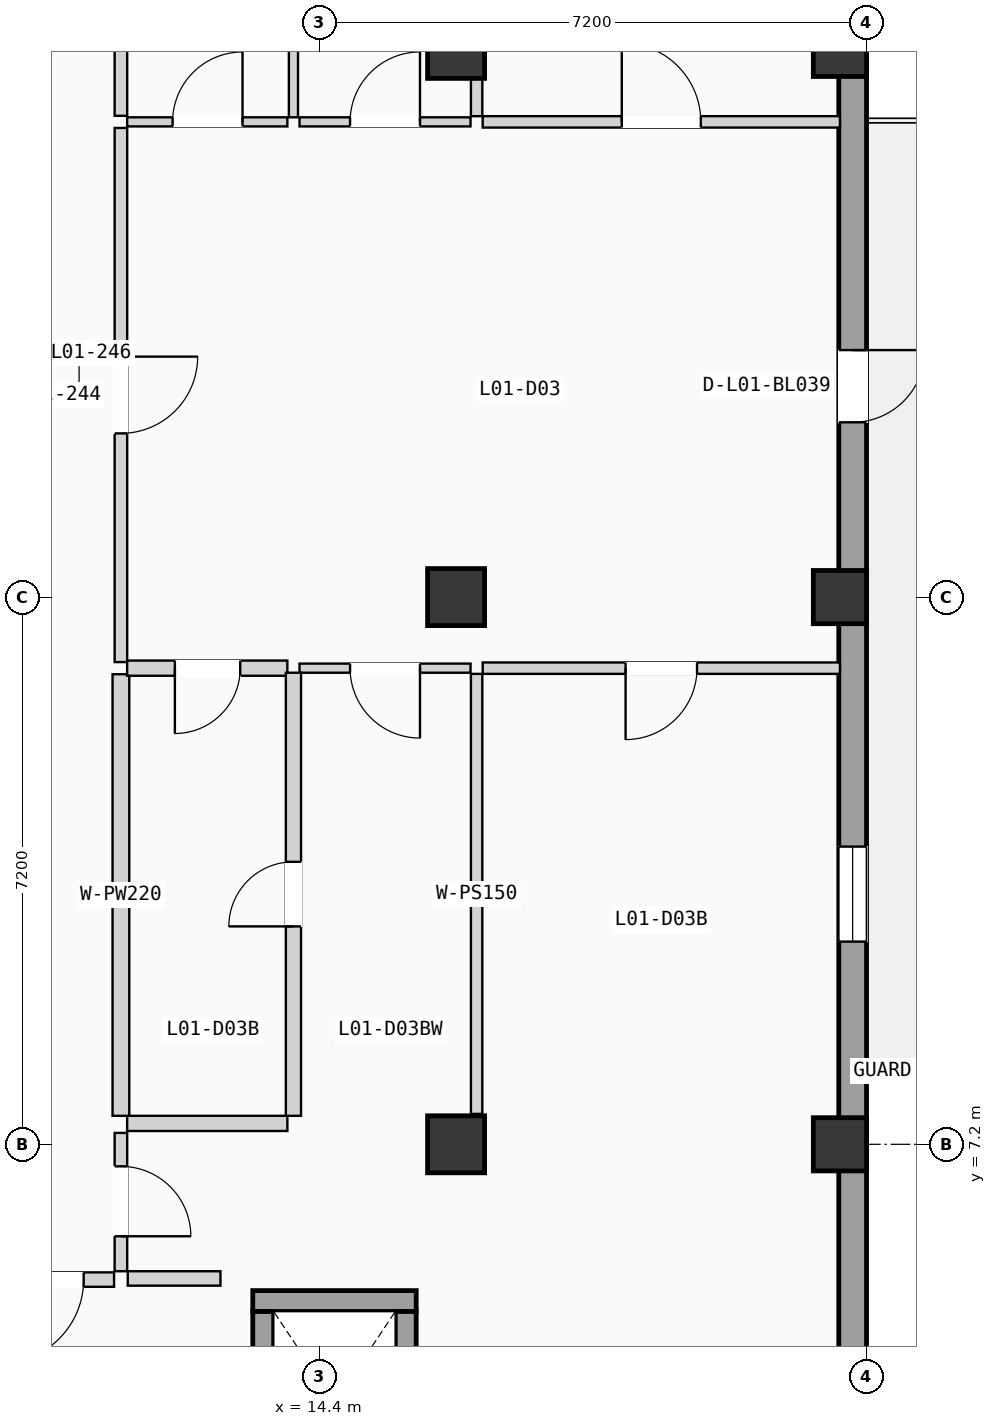
"""IFC4 building model, lengths in metres.
Left out: names, types, materials, properties, quantities, classifications, styles, units other than length and angle.
Written with IfcOpenShell. Run it as: python <this file> out.ifc"""

import sys

from ifc_helpers import new_model, si_unit, direction, frame, frame_2d, origin, origin_2d, place, context, subcontext, project, spatial, rectangle, extrude, element, fill, save


model = new_model("IFC4")
c1 = context("Model", 3, precision=1e-05, world=origin(), true_north=direction((0.0, 1.0)))
c2 = subcontext(c1, "Body", "Model", "MODEL_VIEW")
j1 = project(units=[si_unit("LENGTHUNIT", "METRE"), si_unit("PLANEANGLEUNIT", "RADIAN")], contexts=[c1])
p1 = place(None, origin())
s1 = spatial("IfcSite", under=j1, at=p1, CompositionType="ELEMENT")
p2 = place(p1, origin())
s2 = spatial("IfcBuilding", under=s1, at=p2, CompositionType="ELEMENT")
p3 = place(p2, frame((0.0, 0.0, 4.9)))
s3 = spatial("IfcBuildingStorey", under=s2, at=p3, CompositionType="ELEMENT", Elevation=4.9)
for number, where, z_axis, x_axis in (
    (1, (16.2, 7.2, 0.0), (0.0, 0.0, 1.0), (1.0, 0.0, 0.0)),
    (2, (16.2, 14.4, 0.0), (0.0, 0.0, 1.0), (1.0, 0.0, 0.0)),
    (3, (16.2, 21.6, 0.0), (0.0, 0.0, 1.0), (1.0, 0.0, 0.0)),
):
    element("IfcColumn", number, at=place(p3, frame(where, z_axis=z_axis, x_axis=x_axis)), inside=s3, PredefinedType="COLUMN", context=c2, shape_type="SweptSolid", body=[
        extrude(rectangle(XDim=0.75, YDim=0.75, at=origin_2d()), origin(), (0.0, 0.0, 1.0), 3.675),
    ])
for number, where, z_axis, x_axis in (
    (4, (21.25, 7.2, 0.0), (0.0, 0.0, 1.0), (1.0, 0.0, 0.0)),
    (5, (21.25, 14.4, 0.0), (0.0, 0.0, 1.0), (1.0, 0.0, 0.0)),
    (6, (21.25, 21.6, 0.0), (0.0, 0.0, 1.0), (1.0, 0.0, 0.0)),
):
    element("IfcColumn", number, at=place(p3, frame(where, z_axis=z_axis, x_axis=x_axis)), inside=s3, PredefinedType="COLUMN", context=c2, shape_type="SweptSolid", body=[
        extrude(rectangle(XDim=0.7, YDim=0.7, at=origin_2d()), origin(), (0.0, 0.0, 1.0), 3.675),
    ])
p4 = place(p3, frame((21.417, 0.365, 0.0), z_axis=(0.0, 0.0, 1.0), x_axis=(0.0, 1.0, 0.0)))
e7 = element("IfcWall", 7, at=p4, inside=s3, PredefinedType="SOLIDWALL", context=c2, shape_type="SweptSolid", body=[
    extrude(rectangle(XDim=49.67, YDim=0.365, at=frame_2d((24.835, 0.0))), origin(), (0.0, 0.0, 1.0), 3.415),
])
p5 = place(p4, frame((16.335, 0.0, 0.0)))
e8 = element("IfcOpeningElement", 8, at=p5, cuts=e7, PredefinedType="OPENING", context=c2, shape_type="SweptSolid", body=[
    extrude(rectangle(XDim=0.95, YDim=2.15, at=frame_2d((0.475, 1.075))), frame((0.0, 0.192, 0.0), z_axis=(0.0, -1.0, 0.0), x_axis=(1.0, 0.0, 0.0)), (0.0, 0.0, 1.0), 0.385),
])
p6 = place(p4, frame((9.502, 0.0, 0.9)))
e9 = element("IfcOpeningElement", 9, at=p6, cuts=e7, PredefinedType="OPENING", context=c2, shape_type="SweptSolid", body=[
    extrude(rectangle(XDim=1.25, YDim=1.2, at=frame_2d((0.625, 0.6))), frame((0.0, 0.192, 0.0), z_axis=(0.0, -1.0, 0.0), x_axis=(1.0, 0.0, 0.0)), (0.0, 0.0, 1.0), 0.385),
])
p7 = place(p4, frame((23.204, 0.0, 0.9)))
e10 = element("IfcOpeningElement", 10, at=p7, cuts=e7, PredefinedType="OPENING", context=c2, shape_type="SweptSolid", body=[
    extrude(rectangle(XDim=1.25, YDim=1.35, at=frame_2d((0.625, 0.675))), frame((0.0, 0.192, 0.0), z_axis=(0.0, -1.0, 0.0), x_axis=(1.0, 0.0, 0.0)), (0.0, 0.0, 1.0), 0.385),
])
p8 = place(p4, frame((32.43, 0.0, 0.0)))
e11 = element("IfcOpeningElement", 11, at=p8, cuts=e7, PredefinedType="OPENING", context=c2, shape_type="SweptSolid", body=[
    extrude(rectangle(XDim=1.08, YDim=2.18, at=frame_2d((0.54, 1.09))), frame((0.0, 0.192, 0.0), z_axis=(0.0, -1.0, 0.0), x_axis=(1.0, 0.0, 0.0)), (0.0, 0.0, 1.0), 0.385),
])
p9 = place(p4, frame((29.35, 0.0, 0.9)))
e12 = element("IfcOpeningElement", 12, at=p9, cuts=e7, PredefinedType="OPENING", context=c2, shape_type="SweptSolid", body=[
    extrude(rectangle(XDim=1.25, YDim=1.5, at=frame_2d((0.625, 0.75))), frame((0.0, 0.192, 0.0), z_axis=(0.0, -1.0, 0.0), x_axis=(1.0, 0.0, 0.0)), (0.0, 0.0, 1.0), 0.385),
])
p10 = place(p4, frame((39.354, 0.0, 0.9)))
e13 = element("IfcOpeningElement", 13, at=p10, cuts=e7, PredefinedType="OPENING", context=c2, shape_type="SweptSolid", body=[
    extrude(rectangle(XDim=1.25, YDim=1.65, at=frame_2d((0.625, 0.825))), frame((0.0, 0.192, 0.0), z_axis=(0.0, -1.0, 0.0), x_axis=(1.0, 0.0, 0.0)), (0.0, 0.0, 1.0), 0.385),
])
p11 = place(p3, frame((13.525, 5.137, 0.0), z_axis=(0.0, 0.0, 1.0), x_axis=(1.0, 0.0, 0.0)))
e14 = element("IfcWall", 14, at=p11, inside=s3, PredefinedType="SHEAR", context=c2, shape_type="SweptSolid", body=[
    extrude(rectangle(XDim=2.15, YDim=0.275, at=frame_2d((1.075, 0.0))), origin(), (0.0, 0.0, 1.0), 3.415),
])
p12 = place(p3, frame((13.663, 2.6, 0.0), z_axis=(0.0, 0.0, 1.0), x_axis=(0.0, 1.0, 0.0)))
e15 = element("IfcWall", 15, at=p12, inside=s3, PredefinedType="SHEAR", context=c2, shape_type="SweptSolid", body=[
    extrude(rectangle(XDim=2.4, YDim=0.275, at=frame_2d((1.2, 0.0))), origin(), (0.0, 0.0, 1.0), 3.415),
])
p13 = place(p12, frame((0.65, 0.0, 0.0)))
e16 = element("IfcOpeningElement", 16, at=p13, cuts=e15, PredefinedType="OPENING", context=c2, shape_type="SweptSolid", body=[
    extrude(rectangle(XDim=1.1, YDim=2.15, at=frame_2d((0.55, 1.075))), frame((0.0, 0.147, 0.0), z_axis=(0.0, -1.0, 0.0), x_axis=(1.0, 0.0, 0.0)), (0.0, 0.0, 1.0), 0.295),
])
p14 = place(p3, frame((15.538, 2.6, 0.0), z_axis=(0.0, 0.0, 1.0), x_axis=(0.0, 1.0, 0.0)))
e17 = element("IfcWall", 17, at=p14, inside=s3, PredefinedType="SHEAR", context=c2, shape_type="SweptSolid", body=[
    extrude(rectangle(XDim=2.4, YDim=0.275, at=frame_2d((1.2, 0.0))), origin(), (0.0, 0.0, 1.0), 3.415),
])
p15 = place(p3, frame((11.88, 5.435, 0.0), z_axis=(0.0, 0.0, 1.0), x_axis=(1.0, 0.0, 0.0)))
e18 = element("IfcWall", 18, at=p15, inside=s3, PredefinedType="PARTITIONING", context=c2, shape_type="SweptSolid", body=[
    extrude(rectangle(XDim=1.22, YDim=0.19, at=frame_2d((0.61, 0.0))), origin(), (0.0, 0.0, 1.0), 3.395),
])
p16 = place(p3, frame((9.7, 5.42, 0.0), z_axis=(0.0, 0.0, 1.0), x_axis=(1.0, 0.0, 0.0)))
e19 = element("IfcWall", 19, at=p16, inside=s3, PredefinedType="PARTITIONING", context=c2, shape_type="SweptSolid", body=[
    extrude(rectangle(XDim=2.0, YDim=0.19, at=frame_2d((1.0, 0.0))), origin(), (0.0, 0.0, 1.0), 3.395),
])
p17 = place(p16, frame((0.5, 0.0, 0.0)))
e20 = element("IfcOpeningElement", 20, at=p17, cuts=e19, PredefinedType="OPENING", context=c2, shape_type="SweptSolid", body=[
    extrude(rectangle(XDim=1.1, YDim=2.12, at=frame_2d((0.55, 1.06))), frame((0.0, 0.105, 0.0), z_axis=(0.0, -1.0, 0.0), x_axis=(1.0, 0.0, 0.0)), (0.0, 0.0, 1.0), 0.21),
])
p18 = place(p3, frame((11.79, 5.53, 0.0), z_axis=(0.0, 0.0, 1.0), x_axis=(0.0, 1.0, 0.0)))
e21 = element("IfcWall", 21, at=p18, inside=s3, PredefinedType="PARTITIONING", context=c2, shape_type="SweptSolid", body=[
    extrude(rectangle(XDim=1.82, YDim=0.165, at=frame_2d((0.91, 0.0))), origin(), (0.0, 0.0, 1.0), 3.395),
])
p19 = place(p18, frame((0.46, 0.0, 0.0)))
e22 = element("IfcOpeningElement", 22, at=p19, cuts=e21, PredefinedType="OPENING", context=c2, shape_type="SweptSolid", body=[
    extrude(rectangle(XDim=0.92, YDim=2.04, at=frame_2d((0.46, 1.02))), frame((0.0, 0.093, 0.0), z_axis=(0.0, -1.0, 0.0), x_axis=(1.0, 0.0, 0.0)), (0.0, 0.0, 1.0), 0.185),
])
p20 = place(p3, frame((11.872, 7.475, 0.0), z_axis=(0.0, 0.0, 1.0), x_axis=(1.0, 0.0, 0.0)))
e23 = element("IfcWall", 23, at=p20, inside=s3, PredefinedType="PLUMBINGWALL", context=c2, shape_type="SweptSolid", body=[
    extrude(rectangle(XDim=2.108, YDim=0.2, at=frame_2d((1.054, 0.0))), origin(), (0.0, 0.0, 1.0), 3.395),
])
p21 = place(p3, frame((11.79, 13.545, 0.0), z_axis=(0.0, 0.0, 1.0), x_axis=(0.0, 1.0, 0.0)))
e24 = element("IfcWall", 24, at=p21, inside=s3, PredefinedType="PARTITIONING", context=c2, shape_type="SweptSolid", body=[
    extrude(rectangle(XDim=7.028, YDim=0.165, at=frame_2d((3.514, 0.0))), origin(), (0.0, 0.0, 1.0), 3.395),
])
p22 = place(p21, frame((3.009, 0.0, 0.0)))
e25 = element("IfcOpeningElement", 25, at=p22, cuts=e24, PredefinedType="OPENING", context=c2, shape_type="SweptSolid", body=[
    extrude(rectangle(XDim=1.01, YDim=2.11, at=frame_2d((0.505, 1.055))), frame((0.0, 0.093, 0.0), z_axis=(0.0, -1.0, 0.0), x_axis=(1.0, 0.0, 0.0)), (0.0, 0.0, 1.0), 0.185),
])
p23 = place(p3, frame((11.79, 7.575, 0.0), z_axis=(0.0, 0.0, 1.0), x_axis=(0.0, 1.0, 0.0)))
e26 = element("IfcWall", 26, at=p23, inside=s3, PredefinedType="PLUMBINGWALL", context=c2, shape_type="SweptSolid", body=[
    extrude(rectangle(XDim=5.81, YDim=0.22, at=frame_2d((2.905, 0.0))), origin(), (0.0, 0.0, 1.0), 3.395),
])
p24 = place(p3, frame((11.79, 20.733, 0.0), z_axis=(0.0, 0.0, 1.0), x_axis=(0.0, 1.0, 0.0)))
e27 = element("IfcWall", 27, at=p24, inside=s3, PredefinedType="PARTITIONING", context=c2, shape_type="SweptSolid", body=[
    extrude(rectangle(XDim=5.785, YDim=0.165, at=frame_2d((2.893, 0.0))), origin(), (0.0, 0.0, 1.0), 3.395),
])
p25 = place(p3, frame((11.872, 13.465, 0.0), z_axis=(0.0, 0.0, 1.0), x_axis=(1.0, 0.0, 0.0)))
e28 = element("IfcWall", 28, at=p25, inside=s3, PredefinedType="PLUMBINGWALL", context=c2, shape_type="SweptSolid", body=[
    extrude(rectangle(XDim=2.108, YDim=0.2, at=frame_2d((1.054, 0.0))), origin(), (0.0, 0.0, 1.0), 3.395),
])
p26 = place(p25, frame((0.628, 0.0, 0.0)))
e29 = element("IfcOpeningElement", 29, at=p26, cuts=e28, PredefinedType="OPENING", context=c2, shape_type="SweptSolid", body=[
    extrude(rectangle(XDim=0.86, YDim=2.0, at=frame_2d((0.43, 1.0))), frame((0.0, 0.11, 0.0), z_axis=(0.0, -1.0, 0.0), x_axis=(1.0, 0.0, 0.0)), (0.0, 0.0, 1.0), 0.22),
])
p27 = place(p3, frame((11.872, 20.653, 0.0), z_axis=(0.0, 0.0, 1.0), x_axis=(1.0, 0.0, 0.0)))
e30 = element("IfcWall", 30, at=p27, inside=s3, PredefinedType="PARTITIONING", context=c2, shape_type="SweptSolid", body=[
    extrude(rectangle(XDim=2.108, YDim=0.12, at=frame_2d((1.054, 0.0))), origin(), (0.0, 0.0, 1.0), 3.395),
])
p28 = place(p27, frame((0.598, 0.0, 0.0)))
e31 = element("IfcOpeningElement", 31, at=p28, cuts=e30, PredefinedType="OPENING", context=c2, shape_type="SweptSolid", body=[
    extrude(rectangle(XDim=0.92, YDim=2.02, at=frame_2d((0.46, 1.01))), frame((0.0, 0.07, 0.0), z_axis=(0.0, -1.0, 0.0), x_axis=(1.0, 0.0, 0.0)), (0.0, 0.0, 1.0), 0.14),
])
p29 = place(p3, frame((16.55, 13.465, 0.0), z_axis=(0.0, 0.0, 1.0), x_axis=(1.0, 0.0, 0.0)))
e32 = element("IfcWall", 32, at=p29, inside=s3, PredefinedType="PARTITIONING", context=c2, shape_type="SweptSolid", body=[
    extrude(rectangle(XDim=4.7, YDim=0.15, at=frame_2d((2.35, 0.0))), origin(), (0.0, 0.0, 1.0), 3.395),
])
p30 = place(p29, frame((1.88, 0.0, 0.0)))
e33 = element("IfcOpeningElement", 33, at=p30, cuts=e32, PredefinedType="OPENING", context=c2, shape_type="SweptSolid", body=[
    extrude(rectangle(XDim=0.94, YDim=2.06, at=frame_2d((0.47, 1.03))), frame((0.0, 0.085, 0.0), z_axis=(0.0, -1.0, 0.0), x_axis=(1.0, 0.0, 0.0)), (0.0, 0.0, 1.0), 0.17),
])
p31 = place(p3, frame((14.14, 13.465, 0.0), z_axis=(0.0, 0.0, 1.0), x_axis=(1.0, 0.0, 0.0)))
e34 = element("IfcWall", 34, at=p31, inside=s3, PredefinedType="PARTITIONING", context=c2, shape_type="SweptSolid", body=[
    extrude(rectangle(XDim=2.25, YDim=0.12, at=frame_2d((1.125, 0.0))), origin(), (0.0, 0.0, 1.0), 3.395),
])
p32 = place(p31, frame((0.665, 0.0, 0.0)))
e35 = element("IfcOpeningElement", 35, at=p32, cuts=e34, PredefinedType="OPENING", context=c2, shape_type="SweptSolid", body=[
    extrude(rectangle(XDim=0.92, YDim=2.02, at=frame_2d((0.46, 1.01))), frame((0.0, 0.07, 0.0), z_axis=(0.0, -1.0, 0.0), x_axis=(1.0, 0.0, 0.0)), (0.0, 0.0, 1.0), 0.14),
])
p33 = place(p3, frame((16.55, 20.653, 0.0), z_axis=(0.0, 0.0, 1.0), x_axis=(1.0, 0.0, 0.0)))
e36 = element("IfcWall", 36, at=p33, inside=s3, PredefinedType="PARTITIONING", context=c2, shape_type="SweptSolid", body=[
    extrude(rectangle(XDim=4.7, YDim=0.15, at=frame_2d((2.35, 0.0))), origin(), (0.0, 0.0, 1.0), 3.395),
])
p34 = place(p33, frame((1.83, 0.0, 0.0)))
e37 = element("IfcOpeningElement", 37, at=p34, cuts=e36, PredefinedType="OPENING", context=c2, shape_type="SweptSolid", body=[
    extrude(rectangle(XDim=1.04, YDim=2.08, at=frame_2d((0.52, 1.04))), frame((0.0, 0.085, 0.0), z_axis=(0.0, -1.0, 0.0), x_axis=(1.0, 0.0, 0.0)), (0.0, 0.0, 1.0), 0.17),
])
p35 = place(p3, frame((14.14, 20.653, 0.0), z_axis=(0.0, 0.0, 1.0), x_axis=(1.0, 0.0, 0.0)))
e38 = element("IfcWall", 38, at=p35, inside=s3, PredefinedType="PARTITIONING", context=c2, shape_type="SweptSolid", body=[
    extrude(rectangle(XDim=2.25, YDim=0.12, at=frame_2d((1.125, 0.0))), origin(), (0.0, 0.0, 1.0), 3.395),
])
p36 = place(p35, frame((0.665, 0.0, 0.0)))
e39 = element("IfcOpeningElement", 39, at=p36, cuts=e38, PredefinedType="OPENING", context=c2, shape_type="SweptSolid", body=[
    extrude(rectangle(XDim=0.92, YDim=2.02, at=frame_2d((0.46, 1.01))), frame((0.0, 0.07, 0.0), z_axis=(0.0, -1.0, 0.0), x_axis=(1.0, 0.0, 0.0)), (0.0, 0.0, 1.0), 0.14),
])
p37 = place(p3, frame((14.06, 7.575, 0.0), z_axis=(0.0, 0.0, 1.0), x_axis=(0.0, 1.0, 0.0)))
e40 = element("IfcWall", 40, at=p37, inside=s3, PredefinedType="PLUMBINGWALL", context=c2, shape_type="SweptSolid", body=[
    extrude(rectangle(XDim=5.83, YDim=0.2, at=frame_2d((2.915, 0.0))), origin(), (0.0, 0.0, 1.0), 3.395),
])
p38 = place(p37, frame((2.492, 0.0, 0.0)))
e41 = element("IfcOpeningElement", 41, at=p38, cuts=e40, PredefinedType="OPENING", context=c2, shape_type="SweptSolid", body=[
    extrude(rectangle(XDim=0.85, YDim=2.01, at=frame_2d((0.425, 1.005))), frame((0.0, 0.11, 0.0), z_axis=(0.0, -1.0, 0.0), x_axis=(1.0, 0.0, 0.0)), (0.0, 0.0, 1.0), 0.22),
])
p39 = place(p3, frame((14.06, 20.713, 0.0), z_axis=(0.0, 0.0, 1.0), x_axis=(0.0, 1.0, 0.0)))
e42 = element("IfcWall", 42, at=p39, inside=s3, PredefinedType="PARTITIONING", context=c2, shape_type="SweptSolid", body=[
    extrude(rectangle(XDim=5.805, YDim=0.12, at=frame_2d((2.903, 0.0))), origin(), (0.0, 0.0, 1.0), 3.395),
])
p40 = place(p3, frame((16.47, 7.6, 0.0), z_axis=(0.0, 0.0, 1.0), x_axis=(0.0, 1.0, 0.0)))
e43 = element("IfcWall", 43, at=p40, inside=s3, PredefinedType="PARTITIONING", context=c2, shape_type="SweptSolid", body=[
    extrude(rectangle(XDim=5.79, YDim=0.15, at=frame_2d((2.895, 0.0))), origin(), (0.0, 0.0, 1.0), 3.395),
])
p41 = place(p3, frame((16.47, 20.728, 0.0), z_axis=(0.0, 0.0, 1.0), x_axis=(0.0, 1.0, 0.0)))
e44 = element("IfcWall", 44, at=p41, inside=s3, PredefinedType="PARTITIONING", context=c2, shape_type="SweptSolid", body=[
    extrude(rectangle(XDim=5.79, YDim=0.15, at=frame_2d((2.895, 0.0))), origin(), (0.0, 0.0, 1.0), 3.395),
])
p42 = place(p5, frame((0.95, 0.0, 0.0), z_axis=(0.0, 0.0, 1.0), x_axis=(-1.0, 0.0, 0.0)))
e45 = element("IfcDoor", 45, at=p42, inside=s3, OperationType="SINGLE_SWING_RIGHT", PredefinedType="DOOR", context=c2, shape_type="SweptSolid", body=[
    extrude(rectangle(XDim=0.95, YDim=2.15, at=frame_2d((0.475, 1.075))), frame((0.0, 0.025, 0.0), z_axis=(0.0, -1.0, 0.0), x_axis=(1.0, 0.0, 0.0)), (0.0, 0.0, 1.0), 0.05),
])
fill(e8, e45)
p43 = place(p6, origin())
e46 = element("IfcWindow", 46, at=p43, inside=s3, PartitioningType="SINGLE_PANEL", PredefinedType="WINDOW", context=c2, shape_type="SweptSolid", body=[
    extrude(rectangle(XDim=1.25, YDim=1.2, at=frame_2d((0.625, 0.6))), frame((0.0, 0.03, 0.0), z_axis=(0.0, -1.0, 0.0), x_axis=(1.0, 0.0, 0.0)), (0.0, 0.0, 1.0), 0.06),
])
fill(e9, e46)
p44 = place(p17, frame((1.1, 0.0, 0.0), z_axis=(0.0, 0.0, 1.0), x_axis=(-1.0, 0.0, 0.0)))
e47 = element("IfcDoor", 47, at=p44, inside=s3, OperationType="SINGLE_SWING_LEFT", PredefinedType="DOOR", context=c2, shape_type="SweptSolid", body=[
    extrude(rectangle(XDim=1.1, YDim=2.12, at=frame_2d((0.55, 1.06))), frame((0.0, 0.025, 0.0), z_axis=(0.0, -1.0, 0.0), x_axis=(1.0, 0.0, 0.0)), (0.0, 0.0, 1.0), 0.05),
])
fill(e20, e47)
p45 = place(p19, frame((0.92, 0.0, 0.0), z_axis=(0.0, 0.0, 1.0), x_axis=(-1.0, 0.0, 0.0)))
e48 = element("IfcDoor", 48, at=p45, inside=s3, OperationType="SINGLE_SWING_LEFT", PredefinedType="DOOR", context=c2, shape_type="SweptSolid", body=[
    extrude(rectangle(XDim=0.92, YDim=2.04, at=frame_2d((0.46, 1.02))), frame((0.0, 0.025, 0.0), z_axis=(0.0, -1.0, 0.0), x_axis=(1.0, 0.0, 0.0)), (0.0, 0.0, 1.0), 0.05),
])
fill(e22, e48)
p46 = place(p22, frame((1.01, 0.0, 0.0), z_axis=(0.0, 0.0, 1.0), x_axis=(-1.0, 0.0, 0.0)))
e49 = element("IfcDoor", 49, at=p46, inside=s3, OperationType="SINGLE_SWING_RIGHT", PredefinedType="DOOR", context=c2, shape_type="SweptSolid", body=[
    extrude(rectangle(XDim=1.01, YDim=2.11, at=frame_2d((0.505, 1.055))), frame((0.0, 0.025, 0.0), z_axis=(0.0, -1.0, 0.0), x_axis=(1.0, 0.0, 0.0)), (0.0, 0.0, 1.0), 0.05),
])
fill(e25, e49)
p47 = place(p26, frame((0.86, 0.0, 0.0), z_axis=(0.0, 0.0, 1.0), x_axis=(-1.0, 0.0, 0.0)))
e50 = element("IfcDoor", 50, at=p47, inside=s3, OperationType="SINGLE_SWING_LEFT", PredefinedType="DOOR", context=c2, shape_type="SweptSolid", body=[
    extrude(rectangle(XDim=0.86, YDim=2.0, at=frame_2d((0.43, 1.0))), frame((0.0, 0.025, 0.0), z_axis=(0.0, -1.0, 0.0), x_axis=(1.0, 0.0, 0.0)), (0.0, 0.0, 1.0), 0.05),
])
fill(e29, e50)
p48 = place(p28, origin())
e51 = element("IfcDoor", 51, at=p48, inside=s3, OperationType="SINGLE_SWING_RIGHT", PredefinedType="DOOR", context=c2, shape_type="SweptSolid", body=[
    extrude(rectangle(XDim=0.92, YDim=2.02, at=frame_2d((0.46, 1.01))), frame((0.0, 0.025, 0.0), z_axis=(0.0, -1.0, 0.0), x_axis=(1.0, 0.0, 0.0)), (0.0, 0.0, 1.0), 0.05),
])
fill(e31, e51)
p49 = place(p30, frame((0.94, 0.0, 0.0), z_axis=(0.0, 0.0, 1.0), x_axis=(-1.0, 0.0, 0.0)))
e52 = element("IfcDoor", 52, at=p49, inside=s3, OperationType="SINGLE_SWING_LEFT", PredefinedType="DOOR", context=c2, shape_type="SweptSolid", body=[
    extrude(rectangle(XDim=0.94, YDim=2.06, at=frame_2d((0.47, 1.03))), frame((0.0, 0.025, 0.0), z_axis=(0.0, -1.0, 0.0), x_axis=(1.0, 0.0, 0.0)), (0.0, 0.0, 1.0), 0.05),
])
fill(e33, e52)
p50 = place(p32, frame((0.92, 0.0, 0.0), z_axis=(0.0, 0.0, 1.0), x_axis=(-1.0, 0.0, 0.0)))
e53 = element("IfcDoor", 53, at=p50, inside=s3, OperationType="SINGLE_SWING_RIGHT", PredefinedType="DOOR", context=c2, shape_type="SweptSolid", body=[
    extrude(rectangle(XDim=0.92, YDim=2.02, at=frame_2d((0.46, 1.01))), frame((0.0, 0.025, 0.0), z_axis=(0.0, -1.0, 0.0), x_axis=(1.0, 0.0, 0.0)), (0.0, 0.0, 1.0), 0.05),
])
fill(e35, e53)
p51 = place(p34, origin())
e54 = element("IfcDoor", 54, at=p51, inside=s3, OperationType="SINGLE_SWING_LEFT", PredefinedType="DOOR", context=c2, shape_type="SweptSolid", body=[
    extrude(rectangle(XDim=1.04, YDim=2.08, at=frame_2d((0.52, 1.04))), frame((0.0, 0.025, 0.0), z_axis=(0.0, -1.0, 0.0), x_axis=(1.0, 0.0, 0.0)), (0.0, 0.0, 1.0), 0.05),
])
fill(e37, e54)
p52 = place(p36, origin())
e55 = element("IfcDoor", 55, at=p52, inside=s3, OperationType="SINGLE_SWING_RIGHT", PredefinedType="DOOR", context=c2, shape_type="SweptSolid", body=[
    extrude(rectangle(XDim=0.92, YDim=2.02, at=frame_2d((0.46, 1.01))), frame((0.0, 0.025, 0.0), z_axis=(0.0, -1.0, 0.0), x_axis=(1.0, 0.0, 0.0)), (0.0, 0.0, 1.0), 0.05),
])
fill(e39, e55)
p53 = place(p38, origin())
e56 = element("IfcDoor", 56, at=p53, inside=s3, OperationType="SINGLE_SWING_LEFT", PredefinedType="DOOR", context=c2, shape_type="SweptSolid", body=[
    extrude(rectangle(XDim=0.85, YDim=2.01, at=frame_2d((0.425, 1.005))), frame((0.0, 0.025, 0.0), z_axis=(0.0, -1.0, 0.0), x_axis=(1.0, 0.0, 0.0)), (0.0, 0.0, 1.0), 0.05),
])
fill(e41, e56)
save(model, sys.argv[1])
